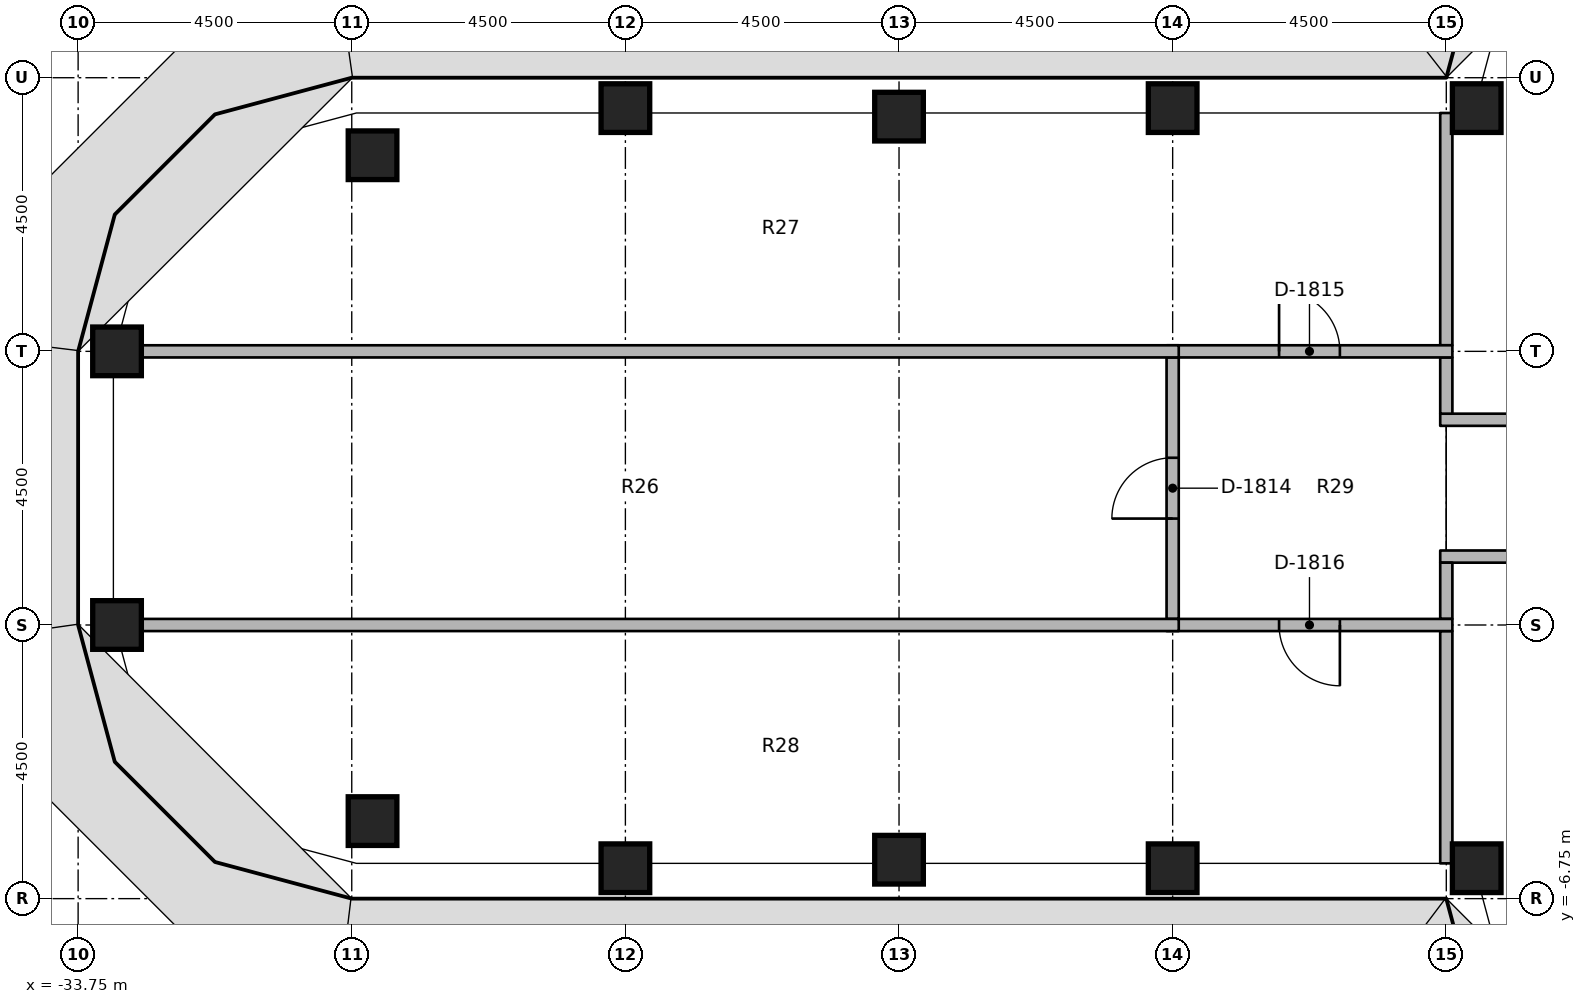
"""IFC4 building model, lengths in metres.
Left out: names, types, materials, properties, quantities, classifications, styles, units other than length and angle.
Written with IfcOpenShell. Run it as: python <this file> out.ifc"""

import sys

from ifc_helpers import new_model, si_unit, direction, frame, frame_2d, origin, origin_2d, place, context, subcontext, project, spatial, rectangle, extrude, element, fill, save


model = new_model("IFC4")
c1 = context("Model", 3, precision=1e-05, world=origin(), true_north=direction((0.0, 1.0)))
c2 = subcontext(c1, "Body", "Model", "MODEL_VIEW")
j1 = project(units=[si_unit("LENGTHUNIT", "METRE"), si_unit("PLANEANGLEUNIT", "RADIAN")], contexts=[c1])
p1 = place(None, origin())
s1 = spatial("IfcSite", under=j1, at=p1, CompositionType="ELEMENT")
p2 = place(p1, origin())
s2 = spatial("IfcBuilding", under=s1, at=p2, CompositionType="ELEMENT")
p3 = place(p2, frame((0.0, 0.0, 171.4)))
s3 = spatial("IfcBuildingStorey", under=s2, at=p3, CompositionType="ELEMENT", Elevation=171.4)
for number, where, z_axis, x_axis in (
    (1, (-33.11, -2.25, 0.0), (0.0, 0.0, 1.0), (1.0, 0.0, 0.0)),
    (2, (-33.11, 2.25, 0.0), (0.0, 0.0, 1.0), (1.0, 0.0, 0.0)),
    (3, (-28.908, -5.475, 0.0), (0.0, 0.0, 1.0), (1.0, 0.0, 0.0)),
    (4, (-28.908, 5.475, 0.0), (0.0, 0.0, 1.0), (1.0, 0.0, 0.0)),
    (5, (-24.75, -6.25, 0.0), (0.0, 0.0, 1.0), (1.0, 0.0, 0.0)),
    (6, (-24.75, 6.25, 0.0), (0.0, 0.0, 1.0), (1.0, 0.0, 0.0)),
    (7, (-20.25, -6.11, 0.0), (0.0, 0.0, 1.0), (1.0, 0.0, 0.0)),
    (8, (-20.25, 6.11, 0.0), (0.0, 0.0, 1.0), (1.0, 0.0, 0.0)),
    (9, (-15.75, -6.25, 0.0), (0.0, 0.0, 1.0), (1.0, 0.0, 0.0)),
    (10, (-15.75, 6.25, 0.0), (0.0, 0.0, 1.0), (1.0, 0.0, 0.0)),
    (11, (-10.75, -6.25, 0.0), (0.0, 0.0, 1.0), (1.0, 0.0, 0.0)),
    (12, (-10.75, 6.25, 0.0), (0.0, 0.0, 1.0), (1.0, 0.0, 0.0)),
):
    element("IfcColumn", number, at=place(p3, frame(where, z_axis=z_axis, x_axis=x_axis)), inside=s3, PredefinedType="COLUMN", context=c2, shape_type="SweptSolid", body=[
        extrude(rectangle(XDim=0.8, YDim=0.8, at=origin_2d()), origin(), (0.0, 0.0, 1.0), 3.65),
    ])
p4 = place(p3, frame((-11.35, 1.125, 0.0), z_axis=(0.0, 0.0, 1.0), x_axis=(1.0, 0.0, 0.0)))
e13 = element("IfcWall", 13, at=p4, inside=s3, PredefinedType="PARTITIONING", context=c2, shape_type="SweptSolid", body=[
    extrude(rectangle(XDim=4.7, YDim=0.2, at=frame_2d((2.35, 0.0))), origin(), (0.0, 0.0, 1.0), 2.75),
])
p5 = place(p4, frame((1.85, 0.0, 0.0)))
e14 = element("IfcOpeningElement", 14, at=p5, cuts=e13, PredefinedType="OPENING", context=c2, shape_type="SweptSolid", body=[
    extrude(rectangle(XDim=1.0, YDim=2.1, at=frame_2d((0.5, 1.05))), frame((0.0, 0.11, 0.0), z_axis=(0.0, -1.0, 0.0), x_axis=(1.0, 0.0, 0.0)), (0.0, 0.0, 1.0), 0.22),
])
p6 = place(p3, frame((-6.65, -1.125, 0.0), z_axis=(0.0, 0.0, 1.0), x_axis=(-1.0, 0.0, 0.0)))
e15 = element("IfcWall", 15, at=p6, inside=s3, PredefinedType="PARTITIONING", context=c2, shape_type="SweptSolid", body=[
    extrude(rectangle(XDim=4.7, YDim=0.2, at=frame_2d((2.35, 0.0))), origin(), (0.0, 0.0, 1.0), 2.75),
])
p7 = place(p6, frame((1.85, 0.0, 0.0)))
e16 = element("IfcOpeningElement", 16, at=p7, cuts=e15, PredefinedType="OPENING", context=c2, shape_type="SweptSolid", body=[
    extrude(rectangle(XDim=1.0, YDim=2.1, at=frame_2d((0.5, 1.05))), frame((0.0, 0.11, 0.0), z_axis=(0.0, -1.0, 0.0), x_axis=(1.0, 0.0, 0.0)), (0.0, 0.0, 1.0), 0.22),
])
p8 = place(p3, frame((-11.25, 1.225, 0.0), z_axis=(0.0, 0.0, 1.0), x_axis=(0.0, 1.0, 0.0)))
e17 = element("IfcWall", 17, at=p8, inside=s3, PredefinedType="PARTITIONING", context=c2, shape_type="SweptSolid", body=[
    extrude(rectangle(XDim=0.925, YDim=0.2, at=frame_2d((0.462, 0.0))), origin(), (0.0, 0.0, 1.0), 2.75),
])
p9 = place(p3, frame((-11.25, 2.35, 0.0), z_axis=(0.0, 0.0, 1.0), x_axis=(0.0, 1.0, 0.0)))
e18 = element("IfcWall", 18, at=p9, inside=s3, PredefinedType="PARTITIONING", context=c2, shape_type="SweptSolid", body=[
    extrude(rectangle(XDim=3.82, YDim=0.2, at=frame_2d((1.91, 0.0))), origin(), (0.0, 0.0, 1.0), 2.75),
])
p10 = place(p3, frame((-11.25, -2.15, 0.0), z_axis=(0.0, 0.0, 1.0), x_axis=(0.0, 1.0, 0.0)))
e19 = element("IfcWall", 19, at=p10, inside=s3, PredefinedType="PARTITIONING", context=c2, shape_type="SweptSolid", body=[
    extrude(rectangle(XDim=0.925, YDim=0.2, at=frame_2d((0.462, 0.0))), origin(), (0.0, 0.0, 1.0), 2.75),
])
p11 = place(p3, frame((-11.25, -6.17, 0.0), z_axis=(0.0, 0.0, 1.0), x_axis=(0.0, 1.0, 0.0)))
e20 = element("IfcWall", 20, at=p11, inside=s3, PredefinedType="PARTITIONING", context=c2, shape_type="SweptSolid", body=[
    extrude(rectangle(XDim=3.82, YDim=0.2, at=frame_2d((1.91, 0.0))), origin(), (0.0, 0.0, 1.0), 2.75),
])
p12 = place(p3, frame((-15.85, 2.25, 0.0), z_axis=(0.0, 0.0, 1.0), x_axis=(1.0, 0.0, 0.0)))
e21 = element("IfcWall", 21, at=p12, inside=s3, PredefinedType="PARTITIONING", context=c2, shape_type="SweptSolid", body=[
    extrude(rectangle(XDim=4.7, YDim=0.2, at=frame_2d((2.35, 0.0))), origin(), (0.0, 0.0, 1.0), 2.75),
])
p13 = place(p12, frame((1.85, 0.0, 0.0)))
e22 = element("IfcOpeningElement", 22, at=p13, cuts=e21, PredefinedType="OPENING", context=c2, shape_type="SweptSolid", body=[
    extrude(rectangle(XDim=1.0, YDim=2.1, at=frame_2d((0.5, 1.05))), frame((0.0, 0.11, 0.0), z_axis=(0.0, -1.0, 0.0), x_axis=(1.0, 0.0, 0.0)), (0.0, 0.0, 1.0), 0.22),
])
p14 = place(p3, frame((-11.15, -2.25, 0.0), z_axis=(0.0, 0.0, 1.0), x_axis=(-1.0, 0.0, 0.0)))
e23 = element("IfcWall", 23, at=p14, inside=s3, PredefinedType="PARTITIONING", context=c2, shape_type="SweptSolid", body=[
    extrude(rectangle(XDim=4.7, YDim=0.2, at=frame_2d((2.35, 0.0))), origin(), (0.0, 0.0, 1.0), 2.75),
])
p15 = place(p14, frame((1.85, 0.0, 0.0)))
e24 = element("IfcOpeningElement", 24, at=p15, cuts=e23, PredefinedType="OPENING", context=c2, shape_type="SweptSolid", body=[
    extrude(rectangle(XDim=1.0, YDim=2.1, at=frame_2d((0.5, 1.05))), frame((0.0, 0.11, 0.0), z_axis=(0.0, -1.0, 0.0), x_axis=(1.0, 0.0, 0.0)), (0.0, 0.0, 1.0), 0.22),
])
p16 = place(p3, frame((-15.75, -2.15, 0.0), z_axis=(0.0, 0.0, 1.0), x_axis=(0.0, 1.0, 0.0)))
e25 = element("IfcWall", 25, at=p16, inside=s3, PredefinedType="PARTITIONING", context=c2, shape_type="SweptSolid", body=[
    extrude(rectangle(XDim=4.3, YDim=0.2, at=frame_2d((2.15, 0.0))), origin(), (0.0, 0.0, 1.0), 2.75),
])
p17 = place(p16, frame((1.65, 0.0, 0.0)))
e26 = element("IfcOpeningElement", 26, at=p17, cuts=e25, PredefinedType="OPENING", context=c2, shape_type="SweptSolid", body=[
    extrude(rectangle(XDim=1.0, YDim=2.1, at=frame_2d((0.5, 1.05))), frame((0.0, 0.11, 0.0), z_axis=(0.0, -1.0, 0.0), x_axis=(1.0, 0.0, 0.0)), (0.0, 0.0, 1.0), 0.22),
])
for number, where, z_axis, x_axis in (
    (27, (-32.71, 2.25, 0.0), (0.0, 0.0, 1.0), (1.0, 0.0, 0.0)),
    (28, (-32.71, -2.25, 0.0), (0.0, 0.0, 1.0), (1.0, 0.0, 0.0)),
):
    element("IfcWall", number, at=place(p3, frame(where, z_axis=z_axis, x_axis=x_axis)), inside=s3, PredefinedType="PARTITIONING", context=c2, shape_type="SweptSolid", body=[
        extrude(rectangle(XDim=17.06, YDim=0.2, at=frame_2d((8.53, 0.0))), origin(), (0.0, 0.0, 1.0), 2.75),
    ])
p18 = place(p17, origin())
e29 = element("IfcDoor", 29, at=p18, inside=s3, OperationType="SINGLE_SWING_RIGHT", PredefinedType="DOOR", context=c2, shape_type="SweptSolid", body=[
    extrude(rectangle(XDim=1.0, YDim=2.1, at=frame_2d((0.5, 1.05))), frame((0.0, 0.025, 0.0), z_axis=(0.0, -1.0, 0.0), x_axis=(1.0, 0.0, 0.0)), (0.0, 0.0, 1.0), 0.05),
])
fill(e26, e29)
p19 = place(p13, origin())
e30 = element("IfcDoor", 30, at=p19, inside=s3, OperationType="SINGLE_SWING_RIGHT", PredefinedType="DOOR", context=c2, shape_type="SweptSolid", body=[
    extrude(rectangle(XDim=1.0, YDim=2.1, at=frame_2d((0.5, 1.05))), frame((0.0, 0.025, 0.0), z_axis=(0.0, -1.0, 0.0), x_axis=(1.0, 0.0, 0.0)), (0.0, 0.0, 1.0), 0.05),
])
fill(e22, e30)
p20 = place(p15, origin())
e31 = element("IfcDoor", 31, at=p20, inside=s3, OperationType="SINGLE_SWING_RIGHT", PredefinedType="DOOR", context=c2, shape_type="SweptSolid", body=[
    extrude(rectangle(XDim=1.0, YDim=2.1, at=frame_2d((0.5, 1.05))), frame((0.0, 0.025, 0.0), z_axis=(0.0, -1.0, 0.0), x_axis=(1.0, 0.0, 0.0)), (0.0, 0.0, 1.0), 0.05),
])
fill(e24, e31)
save(model, sys.argv[1])
